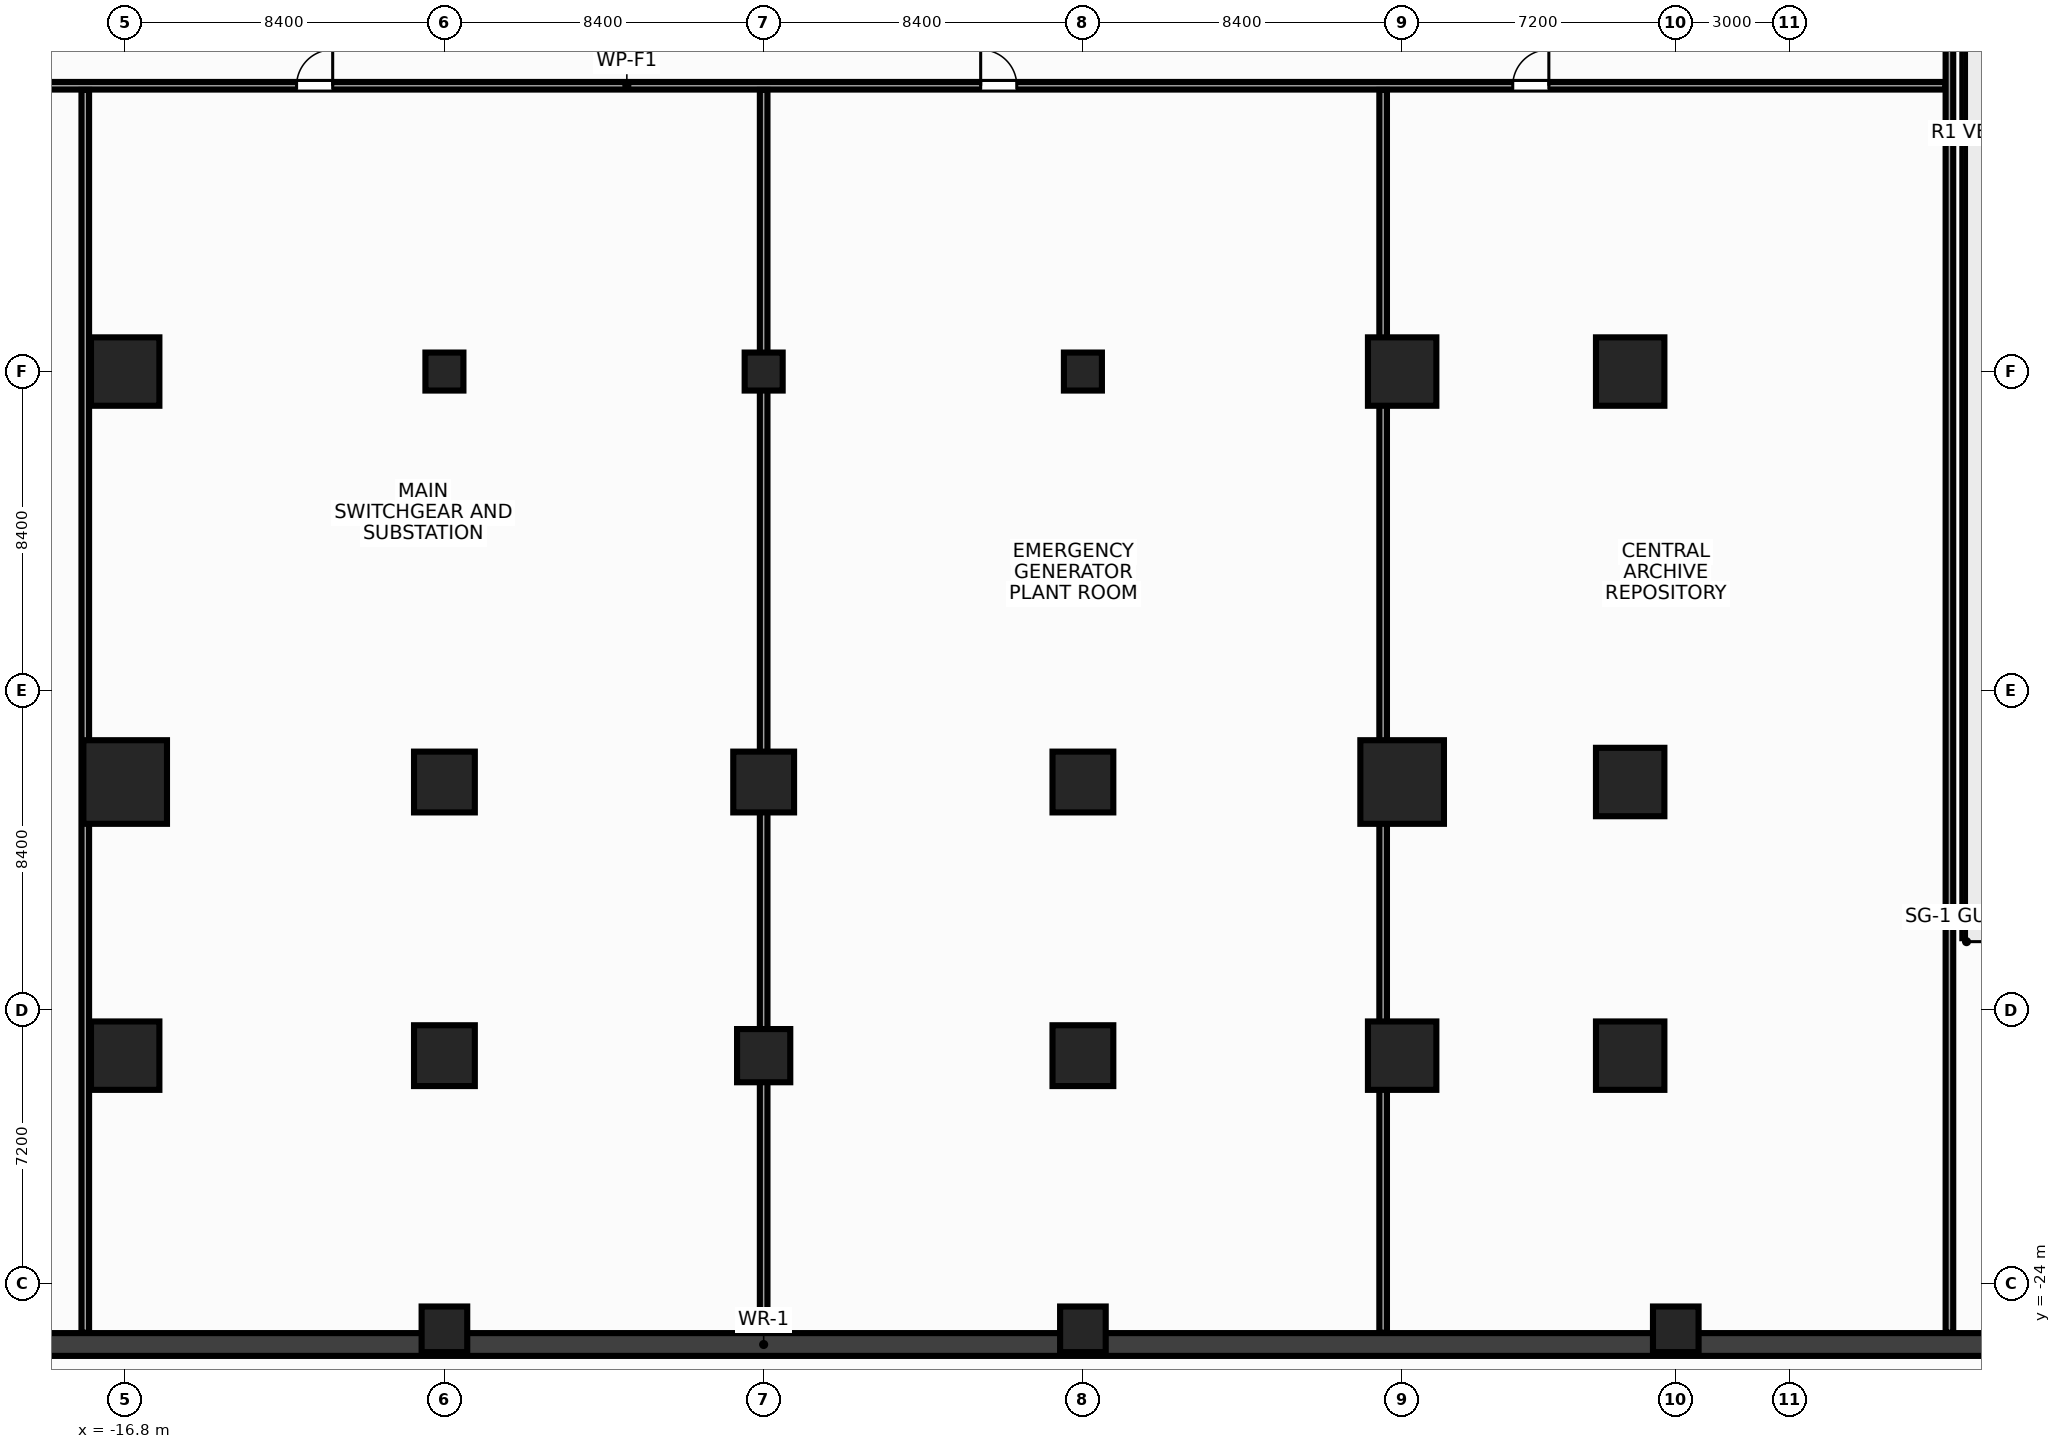
"""IFC4 building model, lengths in metres.
Left out: names, types, materials, properties, quantities, classifications, styles, units other than length and angle.
Written with IfcOpenShell. Run it as: python <this file> out.ifc"""

import sys

from ifc_helpers import new_model, si_unit, direction, frame, frame_2d, origin, origin_with_axes, origin_2d, place, context, subcontext, project, spatial, rectangle, hollow_rectangle, extrude, source, transform, mapped, element, fill, save


model = new_model("IFC4")
c1 = context("Model", 3, precision=1e-05, world=origin(), true_north=direction((0.0, 1.0)))
c2 = subcontext(c1, "Body", "Model", "MODEL_VIEW")
j1 = project(units=[si_unit("LENGTHUNIT", "METRE"), si_unit("PLANEANGLEUNIT", "RADIAN")], contexts=[c1])
p1 = place(None, origin())
s1 = spatial("IfcSite", under=j1, at=p1, CompositionType="ELEMENT")
p2 = place(p1, origin())
s2 = spatial("IfcBuilding", under=s1, at=p2, CompositionType="ELEMENT")
p3 = place(p2, frame((0.0, 0.0, -5.5)))
s3 = spatial("IfcBuildingStorey", under=s2, at=p3, CompositionType="ELEMENT", Elevation=-5.5)
m1 = source(origin(), c2, "Body", "SweptSolid", [
    extrude(rectangle(XDim=77.8, YDim=0.6, at=frame_2d((38.9, 0.0))), origin(), (0.0, 0.0, 1.0), 5.5),
])
p4 = place(p3, frame((-38.9, -25.6, 0.0), z_axis=(0.0, 0.0, 1.0), x_axis=(1.0, 0.0, 0.0)))
e1 = element("IfcWall", 1, at=p4, inside=s3, PredefinedType="SHEAR", context=c2, shape_type="MappedRepresentation", body=[
    mapped(m1, transform((0.0, 0.0, 0.0), x_axis=(1.0, 0.0, 0.0), y_axis=(0.0, 1.0, 0.0), z_axis=(0.0, 0.0, 1.0), scale=1.0)),
])
m2 = source(origin(), c2, "Body", "SweptSolid", [
    extrude(hollow_rectangle(XDim=1.2, YDim=1.2, WallThickness=0.055, at=origin_2d()), origin(), (0.0, 0.0, 1.0), 5.5),
])
for number, where, z_axis, x_axis in (
    (2, (-8.4, -25.2, 0.0), (0.0, 0.0, 1.0), (1.0, 0.0, 0.0)),
    (3, (8.4, -25.2, 0.0), (0.0, 0.0, 1.0), (1.0, 0.0, 0.0)),
    (4, (24.0, -25.2, 0.0), (0.0, 0.0, 1.0), (1.0, 0.0, 0.0)),
):
    element("IfcColumn", number, at=place(p3, frame(where, z_axis=z_axis, x_axis=x_axis)), inside=s3, PredefinedType="COLUMN", context=c2, shape_type="MappedRepresentation", body=[
        mapped(m2, transform((0.0, 0.0, 0.0), x_axis=(1.0, 0.0, 0.0), y_axis=(0.0, 1.0, 0.0), z_axis=(0.0, 0.0, 1.0), scale=1.0)),
    ])
m3 = source(origin(), c2, "Body", "SweptSolid", [
    extrude(rectangle(XDim=1.8, YDim=1.8, at=origin_2d()), origin(), (0.0, 0.0, 1.0), 5.5),
])
p5 = place(p3, frame((-16.8, -18.0, 0.0), z_axis=(0.0, 0.0, 1.0), x_axis=(1.0, 0.0, 0.0)))
e5 = element("IfcColumn", 5, at=p5, inside=s3, PredefinedType="COLUMN", context=c2, shape_type="MappedRepresentation", body=[
    mapped(m3, transform((0.0, 0.0, 0.0), x_axis=(1.0, 0.0, 0.0), y_axis=(0.0, 1.0, 0.0), z_axis=(0.0, 0.0, 1.0), scale=1.0)),
])
m4 = source(origin(), c2, "Body", "SweptSolid", [
    extrude(rectangle(XDim=2.2, YDim=2.2, at=origin_2d()), origin(), (0.0, 0.0, 1.0), 5.5),
])
p6 = place(p3, frame((-16.8, -10.8, 0.0), z_axis=(0.0, 0.0, 1.0), x_axis=(1.0, 0.0, 0.0)))
e6 = element("IfcColumn", 6, at=p6, inside=s3, PredefinedType="COLUMN", context=c2, shape_type="MappedRepresentation", body=[
    mapped(m4, transform((0.0, 0.0, 0.0), x_axis=(1.0, 0.0, 0.0), y_axis=(0.0, 1.0, 0.0), z_axis=(0.0, 0.0, 1.0), scale=1.0)),
])
for number, where, z_axis, x_axis in (
    (7, (-16.8, 0.0, 0.0), (0.0, 0.0, 1.0), (1.0, 0.0, 0.0)),
    (8, (16.8, -18.0, 0.0), (0.0, 0.0, 1.0), (1.0, 0.0, 0.0)),
):
    element("IfcColumn", number, at=place(p3, frame(where, z_axis=z_axis, x_axis=x_axis)), inside=s3, PredefinedType="COLUMN", context=c2, shape_type="MappedRepresentation", body=[
        mapped(m3, transform((0.0, 0.0, 0.0), x_axis=(1.0, 0.0, 0.0), y_axis=(0.0, 1.0, 0.0), z_axis=(0.0, 0.0, 1.0), scale=1.0)),
    ])
p7 = place(p3, frame((16.8, -10.8, 0.0), z_axis=(0.0, 0.0, 1.0), x_axis=(1.0, 0.0, 0.0)))
e9 = element("IfcColumn", 9, at=p7, inside=s3, PredefinedType="COLUMN", context=c2, shape_type="MappedRepresentation", body=[
    mapped(m4, transform((0.0, 0.0, 0.0), x_axis=(1.0, 0.0, 0.0), y_axis=(0.0, 1.0, 0.0), z_axis=(0.0, 0.0, 1.0), scale=1.0)),
])
for number, where, z_axis, x_axis in (
    (10, (16.8, 0.0, 0.0), (0.0, 0.0, 1.0), (1.0, 0.0, 0.0)),
    (11, (22.8, -18.0, 0.0), (0.0, 0.0, 1.0), (1.0, 0.0, 0.0)),
    (12, (22.8, -10.8, 0.0), (0.0, 0.0, 1.0), (1.0, 0.0, 0.0)),
    (13, (22.8, 0.0, 0.0), (0.0, 0.0, 1.0), (1.0, 0.0, 0.0)),
):
    element("IfcColumn", number, at=place(p3, frame(where, z_axis=z_axis, x_axis=x_axis)), inside=s3, PredefinedType="COLUMN", context=c2, shape_type="MappedRepresentation", body=[
        mapped(m3, transform((0.0, 0.0, 0.0), x_axis=(1.0, 0.0, 0.0), y_axis=(0.0, 1.0, 0.0), z_axis=(0.0, 0.0, 1.0), scale=1.0)),
    ])
m5 = source(origin(), c2, "Body", "SweptSolid", [
    extrude(rectangle(XDim=1.6, YDim=1.6, at=origin_2d()), origin(), (0.0, 0.0, 1.0), 5.5),
])
p8 = place(p3, frame((-8.4, -18.0, 0.0), z_axis=(0.0, 0.0, 1.0), x_axis=(1.0, 0.0, 0.0)))
e14 = element("IfcColumn", 14, at=p8, inside=s3, PredefinedType="COLUMN", context=c2, shape_type="MappedRepresentation", body=[
    mapped(m5, transform((0.0, 0.0, 0.0), x_axis=(1.0, 0.0, 0.0), y_axis=(0.0, 1.0, 0.0), z_axis=(0.0, 0.0, 1.0), scale=1.0)),
])
m6 = source(origin(), c2, "Body", "SweptSolid", [
    extrude(hollow_rectangle(XDim=1.0, YDim=1.0, WallThickness=0.045, at=origin_2d()), origin(), (0.0, 0.0, 1.0), 5.5),
])
p9 = place(p3, frame((-8.4, 0.0, 0.0), z_axis=(0.0, 0.0, 1.0), x_axis=(1.0, 0.0, 0.0)))
e15 = element("IfcColumn", 15, at=p9, inside=s3, PredefinedType="COLUMN", context=c2, shape_type="MappedRepresentation", body=[
    mapped(m6, transform((0.0, 0.0, 0.0), x_axis=(1.0, 0.0, 0.0), y_axis=(0.0, 1.0, 0.0), z_axis=(0.0, 0.0, 1.0), scale=1.0)),
])
for number, where, z_axis, x_axis in (
    (16, (-8.4, -10.8, 0.0), (0.0, 0.0, 1.0), (1.0, 0.0, 0.0)),
    (17, (8.4, -18.0, 0.0), (0.0, 0.0, 1.0), (1.0, 0.0, 0.0)),
):
    element("IfcColumn", number, at=place(p3, frame(where, z_axis=z_axis, x_axis=x_axis)), inside=s3, PredefinedType="COLUMN", context=c2, shape_type="MappedRepresentation", body=[
        mapped(m5, transform((0.0, 0.0, 0.0), x_axis=(1.0, 0.0, 0.0), y_axis=(0.0, 1.0, 0.0), z_axis=(0.0, 0.0, 1.0), scale=1.0)),
    ])
p10 = place(p3, frame((8.4, 0.0, 0.0), z_axis=(0.0, 0.0, 1.0), x_axis=(1.0, 0.0, 0.0)))
e18 = element("IfcColumn", 18, at=p10, inside=s3, PredefinedType="COLUMN", context=c2, shape_type="MappedRepresentation", body=[
    mapped(m6, transform((0.0, 0.0, 0.0), x_axis=(1.0, 0.0, 0.0), y_axis=(0.0, 1.0, 0.0), z_axis=(0.0, 0.0, 1.0), scale=1.0)),
])
p11 = place(p3, frame((8.4, -10.8, 0.0), z_axis=(0.0, 0.0, 1.0), x_axis=(1.0, 0.0, 0.0)))
e19 = element("IfcColumn", 19, at=p11, inside=s3, PredefinedType="COLUMN", context=c2, shape_type="MappedRepresentation", body=[
    mapped(m5, transform((0.0, 0.0, 0.0), x_axis=(1.0, 0.0, 0.0), y_axis=(0.0, 1.0, 0.0), z_axis=(0.0, 0.0, 1.0), scale=1.0)),
])
m7 = source(origin(), c2, "Body", "SweptSolid", [
    extrude(rectangle(XDim=1.4, YDim=1.4, at=origin_2d()), origin(), (0.0, 0.0, 1.0), 5.5),
])
p12 = place(p3, frame((0.0, -18.0, 0.0), z_axis=(0.0, 0.0, 1.0), x_axis=(1.0, 0.0, 0.0)))
e20 = element("IfcColumn", 20, at=p12, inside=s3, PredefinedType="COLUMN", context=c2, shape_type="MappedRepresentation", body=[
    mapped(m7, transform((0.0, 0.0, 0.0), x_axis=(1.0, 0.0, 0.0), y_axis=(0.0, 1.0, 0.0), z_axis=(0.0, 0.0, 1.0), scale=1.0)),
])
p13 = place(p3, frame((0.0, -10.8, 0.0), z_axis=(0.0, 0.0, 1.0), x_axis=(1.0, 0.0, 0.0)))
e21 = element("IfcColumn", 21, at=p13, inside=s3, PredefinedType="COLUMN", context=c2, shape_type="MappedRepresentation", body=[
    mapped(m5, transform((0.0, 0.0, 0.0), x_axis=(1.0, 0.0, 0.0), y_axis=(0.0, 1.0, 0.0), z_axis=(0.0, 0.0, 1.0), scale=1.0)),
])
m8 = source(origin(), c2, "Body", "SweptSolid", [
    extrude(rectangle(XDim=1.0, YDim=1.0, at=origin_2d()), origin(), (0.0, 0.0, 1.0), 5.5),
])
p14 = place(p3, origin_with_axes())
e22 = element("IfcColumn", 22, at=p14, inside=s3, PredefinedType="COLUMN", context=c2, shape_type="MappedRepresentation", body=[
    mapped(m8, transform((0.0, 0.0, 0.0), x_axis=(1.0, 0.0, 0.0), y_axis=(0.0, 1.0, 0.0), z_axis=(0.0, 0.0, 1.0), scale=1.0)),
])
m9 = source(origin(), c2, "Body", "SweptSolid", [
    extrude(rectangle(XDim=69.38, YDim=0.2, at=frame_2d((34.69, 0.0))), origin(), (0.0, 0.0, 1.0), 4.525),
])
p15 = place(p3, frame((-38.29, 7.52, 0.0), z_axis=(0.0, 0.0, 1.0), x_axis=(1.0, 0.0, 0.0)))
e23 = element("IfcWall", 23, at=p15, inside=s3, PredefinedType="PARTITIONING", context=c2, shape_type="MappedRepresentation", body=[
    mapped(m9, transform((0.0, 0.0, 0.0), x_axis=(1.0, 0.0, 0.0), y_axis=(0.0, 1.0, 0.0), z_axis=(0.0, 0.0, 1.0), scale=1.0)),
])
p16 = place(p15, frame((8.0, 0.0, 0.0)))
e24 = element("IfcOpeningElement", 24, at=p16, cuts=e23, PredefinedType="OPENING", context=c2, shape_type="SweptSolid", body=[
    extrude(rectangle(XDim=0.95, YDim=2.15, at=frame_2d((0.475, 1.075))), frame((0.0, 0.112, 0.0), z_axis=(0.0, -1.0, 0.0), x_axis=(1.0, 0.0, 0.0)), (0.0, 0.0, 1.0), 0.224),
])
p17 = place(p15, frame((26.0, 0.0, 0.0)))
e25 = element("IfcOpeningElement", 25, at=p17, cuts=e23, PredefinedType="OPENING", context=c2, shape_type="SweptSolid", body=[
    extrude(rectangle(XDim=0.95, YDim=2.15, at=frame_2d((0.475, 1.075))), frame((0.0, 0.112, 0.0), z_axis=(0.0, -1.0, 0.0), x_axis=(1.0, 0.0, 0.0)), (0.0, 0.0, 1.0), 0.224),
])
p18 = place(p15, frame((44.0, 0.0, 0.0)))
e26 = element("IfcOpeningElement", 26, at=p18, cuts=e23, PredefinedType="OPENING", context=c2, shape_type="SweptSolid", body=[
    extrude(rectangle(XDim=0.95, YDim=2.15, at=frame_2d((0.475, 1.075))), frame((0.0, 0.112, 0.0), z_axis=(0.0, -1.0, 0.0), x_axis=(1.0, 0.0, 0.0)), (0.0, 0.0, 1.0), 0.224),
])
p19 = place(p15, frame((58.0, 0.0, 0.0)))
e27 = element("IfcOpeningElement", 27, at=p19, cuts=e23, PredefinedType="OPENING", context=c2, shape_type="SweptSolid", body=[
    extrude(rectangle(XDim=0.95, YDim=2.15, at=frame_2d((0.475, 1.075))), frame((0.0, 0.112, 0.0), z_axis=(0.0, -1.0, 0.0), x_axis=(1.0, 0.0, 0.0)), (0.0, 0.0, 1.0), 0.224),
])
m10 = source(origin(), c2, "Body", "SweptSolid", [
    extrude(rectangle(XDim=32.7, YDim=0.2, at=frame_2d((16.35, 0.0))), origin(), (0.0, 0.0, 1.0), 4.525),
])
for number, where, z_axis, x_axis in (
    (28, (-17.85, -25.29, 0.0), (0.0, 0.0, 1.0), (0.0, 1.0, 0.0)),
    (29, (0.0, -25.29, 0.0), (0.0, 0.0, 1.0), (0.0, 1.0, 0.0)),
):
    element("IfcWall", number, at=place(p3, frame(where, z_axis=z_axis, x_axis=x_axis)), inside=s3, PredefinedType="PARTITIONING", context=c2, shape_type="MappedRepresentation", body=[
        mapped(m10, transform((0.0, 0.0, 0.0), x_axis=(1.0, 0.0, 0.0), y_axis=(0.0, 1.0, 0.0), z_axis=(0.0, 0.0, 1.0), scale=1.0)),
    ])
m11 = source(origin(), c2, "Body", "SweptSolid", [
    extrude(rectangle(XDim=32.7, YDim=0.2, at=frame_2d((16.35, 0.0))), origin(), (0.0, 0.0, 1.0), 5.14),
])
p20 = place(p3, frame((16.3, -25.29, 0.0), z_axis=(0.0, 0.0, 1.0), x_axis=(0.0, 1.0, 0.0)))
e30 = element("IfcWall", 30, at=p20, inside=s3, PredefinedType="PARTITIONING", context=c2, shape_type="MappedRepresentation", body=[
    mapped(m11, transform((0.0, 0.0, 0.0), x_axis=(1.0, 0.0, 0.0), y_axis=(0.0, 1.0, 0.0), z_axis=(0.0, 0.0, 1.0), scale=1.0)),
])
m12 = source(origin(), c2, "Body", "SweptSolid", [
    extrude(rectangle(XDim=48.78, YDim=0.2, at=frame_2d((24.39, 0.0))), origin(), (0.0, 0.0, 1.0), 5.14),
])
p21 = place(p3, frame((31.2, -25.29, 0.0), z_axis=(0.0, 0.0, 1.0), x_axis=(0.0, 1.0, 0.0)))
e31 = element("IfcWall", 31, at=p21, inside=s3, PredefinedType="PARTITIONING", context=c2, shape_type="MappedRepresentation", body=[
    mapped(m12, transform((0.0, 0.0, 0.0), x_axis=(1.0, 0.0, 0.0), y_axis=(0.0, 1.0, 0.0), z_axis=(0.0, 0.0, 1.0), scale=1.0)),
])
m13 = source(origin(), c2, "Body", "SweptSolid", [
    extrude(rectangle(XDim=0.95, YDim=2.15, at=frame_2d((0.475, 1.075))), frame((0.0, 0.025, 0.0), z_axis=(0.0, -1.0, 0.0), x_axis=(1.0, 0.0, 0.0)), (0.0, 0.0, 1.0), 0.05),
])
p22 = place(p17, origin())
e32 = element("IfcDoor", 32, at=p22, inside=s3, OperationType="SINGLE_SWING_RIGHT", PredefinedType="DOOR", context=c2, shape_type="MappedRepresentation", body=[
    mapped(m13, transform((0.0, 0.0, 0.0), x_axis=(1.0, 0.0, 0.0), y_axis=(0.0, 1.0, 0.0), z_axis=(0.0, 0.0, 1.0), scale=1.0)),
])
fill(e25, e32)
p23 = place(p18, origin())
e33 = element("IfcDoor", 33, at=p23, inside=s3, OperationType="SINGLE_SWING_LEFT", PredefinedType="DOOR", context=c2, shape_type="MappedRepresentation", body=[
    mapped(m13, transform((0.0, 0.0, 0.0), x_axis=(1.0, 0.0, 0.0), y_axis=(0.0, 1.0, 0.0), z_axis=(0.0, 0.0, 1.0), scale=1.0)),
])
fill(e26, e33)
p24 = place(p19, origin())
e34 = element("IfcDoor", 34, at=p24, inside=s3, OperationType="SINGLE_SWING_RIGHT", PredefinedType="DOOR", context=c2, shape_type="MappedRepresentation", body=[
    mapped(m13, transform((0.0, 0.0, 0.0), x_axis=(1.0, 0.0, 0.0), y_axis=(0.0, 1.0, 0.0), z_axis=(0.0, 0.0, 1.0), scale=1.0)),
])
fill(e27, e34)
save(model, sys.argv[1])
